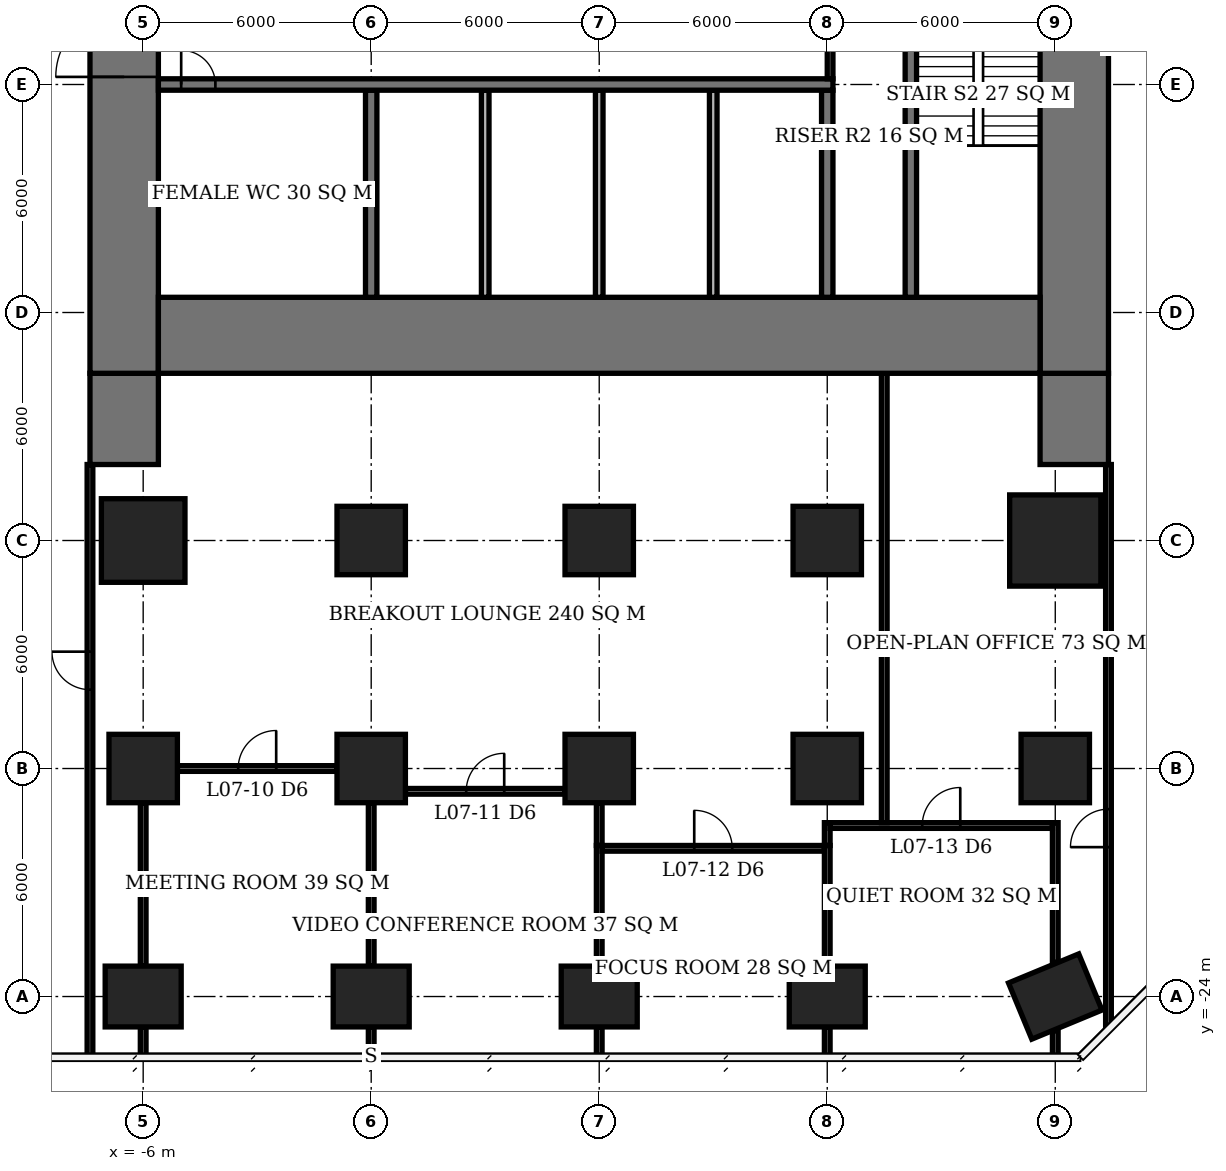
"""IFC4 building model, lengths in metres.
Left out: names, types, materials, properties, quantities, classifications, styles, units other than length and angle.
Written with IfcOpenShell. Run it as: python <this file> out.ifc"""

import sys

from ifc_helpers import new_model, si_unit, direction, frame, frame_2d, origin, origin_2d, place, context, subcontext, project, spatial, rectangle, extrude, element, fill, save


model = new_model("IFC4")
c1 = context("Model", 3, precision=1e-05, world=origin(), true_north=direction((0.0, 1.0)))
c2 = subcontext(c1, "Body", "Model", "MODEL_VIEW")
j1 = project(units=[si_unit("LENGTHUNIT", "METRE"), si_unit("PLANEANGLEUNIT", "RADIAN")], contexts=[c1])
p1 = place(None, origin())
s1 = spatial("IfcSite", under=j1, at=p1, CompositionType="ELEMENT")
p2 = place(p1, origin())
s2 = spatial("IfcBuilding", under=s1, at=p2, CompositionType="ELEMENT")
p3 = place(p2, frame((0.0, 0.0, 33.8)))
s3 = spatial("IfcBuildingStorey", under=s2, at=p3, CompositionType="ELEMENT", Elevation=33.8)
p4 = place(p3, frame((-6.0, -24.0, 0.0), z_axis=(0.0, 0.0, 1.0), x_axis=(1.0, 0.0, 0.0)))
e1 = element("IfcColumn", 1, at=p4, inside=s3, PredefinedType="COLUMN", context=c2, shape_type="SweptSolid", body=[
    extrude(rectangle(XDim=2.0, YDim=1.6, at=origin_2d()), origin(), (0.0, 0.0, 1.0), 3.9),
])
p5 = place(p3, frame((-6.0, -18.0, 0.0), z_axis=(0.0, 0.0, 1.0), x_axis=(1.0, 0.0, 0.0)))
e2 = element("IfcColumn", 2, at=p5, inside=s3, PredefinedType="COLUMN", context=c2, shape_type="SweptSolid", body=[
    extrude(rectangle(XDim=1.8, YDim=1.8, at=origin_2d()), origin(), (0.0, 0.0, 1.0), 3.9),
])
p6 = place(p3, frame((-6.0, -12.0, 0.0), z_axis=(0.0, 0.0, 1.0), x_axis=(1.0, 0.0, 0.0)))
e3 = element("IfcColumn", 3, at=p6, inside=s3, PredefinedType="COLUMN", context=c2, shape_type="SweptSolid", body=[
    extrude(rectangle(XDim=2.2, YDim=2.2, at=origin_2d()), origin(), (0.0, 0.0, 1.0), 3.9),
])
p7 = place(p3, frame((0.0, -24.0, 0.0), z_axis=(0.0, 0.0, 1.0), x_axis=(1.0, 0.0, 0.0)))
e4 = element("IfcColumn", 4, at=p7, inside=s3, PredefinedType="COLUMN", context=c2, shape_type="SweptSolid", body=[
    extrude(rectangle(XDim=2.0, YDim=1.6, at=origin_2d()), origin(), (0.0, 0.0, 1.0), 3.9),
])
for number, where, z_axis, x_axis in (
    (5, (0.0, -18.0, 0.0), (0.0, 0.0, 1.0), (1.0, 0.0, 0.0)),
    (6, (0.0, -12.0, 0.0), (0.0, 0.0, 1.0), (1.0, 0.0, 0.0)),
):
    element("IfcColumn", number, at=place(p3, frame(where, z_axis=z_axis, x_axis=x_axis)), inside=s3, PredefinedType="COLUMN", context=c2, shape_type="SweptSolid", body=[
        extrude(rectangle(XDim=1.8, YDim=1.8, at=origin_2d()), origin(), (0.0, 0.0, 1.0), 3.9),
    ])
p8 = place(p3, frame((6.0, -24.0, 0.0), z_axis=(0.0, 0.0, 1.0), x_axis=(1.0, 0.0, 0.0)))
e7 = element("IfcColumn", 7, at=p8, inside=s3, PredefinedType="COLUMN", context=c2, shape_type="SweptSolid", body=[
    extrude(rectangle(XDim=2.0, YDim=1.6, at=origin_2d()), origin(), (0.0, 0.0, 1.0), 3.9),
])
for number, where, z_axis, x_axis in (
    (8, (6.0, -18.0, 0.0), (0.0, 0.0, 1.0), (1.0, 0.0, 0.0)),
    (9, (6.0, -12.0, 0.0), (0.0, 0.0, 1.0), (1.0, 0.0, 0.0)),
):
    element("IfcColumn", number, at=place(p3, frame(where, z_axis=z_axis, x_axis=x_axis)), inside=s3, PredefinedType="COLUMN", context=c2, shape_type="SweptSolid", body=[
        extrude(rectangle(XDim=1.8, YDim=1.8, at=origin_2d()), origin(), (0.0, 0.0, 1.0), 3.9),
    ])
p9 = place(p3, frame((12.0, -24.0, 0.0), z_axis=(0.0, 0.0, 1.0), x_axis=(1.0, 0.0, 0.0)))
e10 = element("IfcColumn", 10, at=p9, inside=s3, PredefinedType="COLUMN", context=c2, shape_type="SweptSolid", body=[
    extrude(rectangle(XDim=2.0, YDim=1.6, at=origin_2d()), origin(), (0.0, 0.0, 1.0), 3.9),
])
for number, where, z_axis, x_axis in (
    (11, (12.0, -18.0, 0.0), (0.0, 0.0, 1.0), (1.0, 0.0, 0.0)),
    (12, (12.0, -12.0, 0.0), (0.0, 0.0, 1.0), (1.0, 0.0, 0.0)),
):
    element("IfcColumn", number, at=place(p3, frame(where, z_axis=z_axis, x_axis=x_axis)), inside=s3, PredefinedType="COLUMN", context=c2, shape_type="SweptSolid", body=[
        extrude(rectangle(XDim=1.8, YDim=1.8, at=origin_2d()), origin(), (0.0, 0.0, 1.0), 3.9),
    ])
p10 = place(p3, frame((18.0, -24.0, 0.0), z_axis=(0.0, 0.0, 1.0), x_axis=(-0.923879532511, -0.382683432365, 0.0)))
e13 = element("IfcColumn", 13, at=p10, inside=s3, PredefinedType="COLUMN", context=c2, shape_type="SweptSolid", body=[
    extrude(rectangle(XDim=2.0, YDim=1.6, at=origin_2d()), origin(), (0.0, 0.0, 1.0), 3.9),
])
p11 = place(p3, frame((18.0, -18.0, 0.0), z_axis=(0.0, 0.0, 1.0), x_axis=(1.0, 0.0, 0.0)))
e14 = element("IfcColumn", 14, at=p11, inside=s3, PredefinedType="COLUMN", context=c2, shape_type="SweptSolid", body=[
    extrude(rectangle(XDim=1.8, YDim=1.8, at=origin_2d()), origin(), (0.0, 0.0, 1.0), 3.9),
])
p12 = place(p3, frame((18.0, -12.0, 0.0), z_axis=(0.0, 0.0, 1.0), x_axis=(1.0, 0.0, 0.0)))
e15 = element("IfcColumn", 15, at=p12, inside=s3, PredefinedType="COLUMN", context=c2, shape_type="SweptSolid", body=[
    extrude(rectangle(XDim=2.4, YDim=2.4, at=origin_2d()), origin(), (0.0, 0.0, 1.0), 3.9),
])
p13 = place(p3, frame((-5.6, -6.6, 0.0), z_axis=(0.0, 0.0, 1.0), x_axis=(1.0, 0.0, 0.0)))
e16 = element("IfcWall", 16, at=p13, inside=s3, PredefinedType="SHEAR", context=c2, shape_type="SweptSolid", body=[
    extrude(rectangle(XDim=23.2, YDim=2.0, at=frame_2d((11.6, 0.0))), origin(), (0.0, 0.0, 1.0), 3.9),
])
p14 = place(p3, frame((-6.5, -7.6, 0.0), z_axis=(0.0, 0.0, 1.0), x_axis=(0.0, 1.0, 0.0)))
e17 = element("IfcWall", 17, at=p14, inside=s3, PredefinedType="SHEAR", context=c2, shape_type="SweptSolid", body=[
    extrude(rectangle(XDim=21.2, YDim=1.8, at=frame_2d((10.6, 0.0))), origin(), (0.0, 0.0, 1.0), 3.9),
])
p15 = place(p14, frame((7.8, 0.0, 0.0)))
e18 = element("IfcOpeningElement", 18, at=p15, cuts=e17, PredefinedType="OPENING", context=c2, shape_type="SweptSolid", body=[
    extrude(rectangle(XDim=1.8, YDim=2.4, at=frame_2d((0.9, 1.2))), frame((0.0, 0.91, 0.0), z_axis=(0.0, -1.0, 0.0), x_axis=(1.0, 0.0, 0.0)), (0.0, 0.0, 1.0), 1.82),
])
p16 = place(p3, frame((18.5, -7.6, 0.0), z_axis=(0.0, 0.0, 1.0), x_axis=(0.0, 1.0, 0.0)))
e19 = element("IfcWall", 19, at=p16, inside=s3, PredefinedType="SHEAR", context=c2, shape_type="SweptSolid", body=[
    extrude(rectangle(XDim=21.2, YDim=1.8, at=frame_2d((10.6, 0.0))), origin(), (0.0, 0.0, 1.0), 3.9),
])
p17 = place(p16, frame((9.2, 0.0, 0.0)))
e20 = element("IfcOpeningElement", 20, at=p17, cuts=e19, PredefinedType="OPENING", context=c2, shape_type="SweptSolid", body=[
    extrude(rectangle(XDim=1.8, YDim=2.4, at=frame_2d((0.9, 1.2))), frame((0.0, 0.91, 0.0), z_axis=(0.0, -1.0, 0.0), x_axis=(1.0, 0.0, 0.0)), (0.0, 0.0, 1.0), 1.82),
])
for number, where, z_axis, x_axis in (
    (21, (-6.5, -10.0, 0.0), (0.0, 0.0, 1.0), (0.0, 1.0, 0.0)),
    (22, (18.5, -10.0, 0.0), (0.0, 0.0, 1.0), (0.0, 1.0, 0.0)),
):
    element("IfcWall", number, at=place(p3, frame(where, z_axis=z_axis, x_axis=x_axis)), inside=s3, PredefinedType="SHEAR", context=c2, shape_type="SweptSolid", body=[
        extrude(rectangle(XDim=2.4, YDim=1.8, at=frame_2d((1.2, 0.0))), origin(), (0.0, 0.0, 1.0), 3.9),
    ])
p18 = place(p3, frame((-5.6, 0.0, 0.0), z_axis=(0.0, 0.0, 1.0), x_axis=(1.0, 0.0, 0.0)))
e23 = element("IfcWall", 23, at=p18, inside=s3, PredefinedType="SHEAR", context=c2, shape_type="SweptSolid", body=[
    extrude(rectangle(XDim=17.75, YDim=0.3, at=frame_2d((8.875, 0.0))), origin(), (0.0, 0.0, 1.0), 3.9),
])
p19 = place(p18, frame((0.6, 0.0, 0.0)))
e24 = element("IfcOpeningElement", 24, at=p19, cuts=e23, PredefinedType="OPENING", context=c2, shape_type="SweptSolid", body=[
    extrude(rectangle(XDim=0.9, YDim=2.1, at=frame_2d((0.45, 1.05))), frame((0.0, 0.16, 0.0), z_axis=(0.0, -1.0, 0.0), x_axis=(1.0, 0.0, 0.0)), (0.0, 0.0, 1.0), 0.32),
])
for number, where, z_axis, x_axis in (
    (25, (0.0, -5.6, 0.0), (0.0, 0.0, 1.0), (0.0, 1.0, 0.0)),
    (26, (12.0, -5.6, 0.0), (0.0, 0.0, 1.0), (0.0, 1.0, 0.0)),
):
    element("IfcWall", number, at=place(p3, frame(where, z_axis=z_axis, x_axis=x_axis)), inside=s3, PredefinedType="SHEAR", context=c2, shape_type="SweptSolid", body=[
        extrude(rectangle(XDim=5.45, YDim=0.3, at=frame_2d((2.725, 0.0))), origin(), (0.0, 0.0, 1.0), 3.9),
    ])
p20 = place(p3, frame((14.2, -5.6, 0.0), z_axis=(0.0, 0.0, 1.0), x_axis=(0.0, 1.0, 0.0)))
e27 = element("IfcWall", 27, at=p20, inside=s3, PredefinedType="SHEAR", context=c2, shape_type="SweptSolid", body=[
    extrude(rectangle(XDim=8.45, YDim=0.3, at=frame_2d((4.225, 0.0))), origin(), (0.0, 0.0, 1.0), 3.9),
])
for number, where, z_axis, x_axis in (
    (28, (3.0, -5.6, 0.0), (0.0, 0.0, 1.0), (0.0, 1.0, 0.0)),
    (29, (6.0, -5.6, 0.0), (0.0, 0.0, 1.0), (0.0, 1.0, 0.0)),
    (30, (9.0, -5.6, 0.0), (0.0, 0.0, 1.0), (0.0, 1.0, 0.0)),
):
    element("IfcWall", number, at=place(p3, frame(where, z_axis=z_axis, x_axis=x_axis)), inside=s3, PredefinedType="SOLIDWALL", context=c2, shape_type="SweptSolid", body=[
        extrude(rectangle(XDim=5.45, YDim=0.2, at=frame_2d((2.725, 0.0))), origin(), (0.0, 0.0, 1.0), 3.9),
    ])
p21 = place(p3, frame((6.075, -20.1, 0.0), z_axis=(0.0, 0.0, 1.0), x_axis=(1.0, 0.0, 0.0)))
e31 = element("IfcWall", 31, at=p21, inside=s3, PredefinedType="PARTITIONING", context=c2, shape_type="SweptSolid", body=[
    extrude(rectangle(XDim=5.85, YDim=0.15, at=frame_2d((2.925, 0.0))), origin(), (0.0, 0.0, 1.0), 3.65),
])
p22 = place(p21, frame((2.425, 0.0, 0.0)))
e32 = element("IfcOpeningElement", 32, at=p22, cuts=e31, PredefinedType="OPENING", context=c2, shape_type="SweptSolid", body=[
    extrude(rectangle(XDim=1.0, YDim=2.1, at=frame_2d((0.5, 1.05))), frame((0.0, 0.085, 0.0), z_axis=(0.0, -1.0, 0.0), x_axis=(1.0, 0.0, 0.0)), (0.0, 0.0, 1.0), 0.17),
])
p23 = place(p3, frame((12.075, -19.5, 0.0), z_axis=(0.0, 0.0, 1.0), x_axis=(1.0, 0.0, 0.0)))
e33 = element("IfcWall", 33, at=p23, inside=s3, PredefinedType="PARTITIONING", context=c2, shape_type="SweptSolid", body=[
    extrude(rectangle(XDim=5.85, YDim=0.15, at=frame_2d((2.925, 0.0))), origin(), (0.0, 0.0, 1.0), 3.65),
])
p24 = place(p23, frame((2.425, 0.0, 0.0)))
e34 = element("IfcOpeningElement", 34, at=p24, cuts=e33, PredefinedType="OPENING", context=c2, shape_type="SweptSolid", body=[
    extrude(rectangle(XDim=1.0, YDim=2.1, at=frame_2d((0.5, 1.05))), frame((0.0, 0.085, 0.0), z_axis=(0.0, -1.0, 0.0), x_axis=(1.0, 0.0, 0.0)), (0.0, 0.0, 1.0), 0.17),
])
p25 = place(p3, frame((0.9, -18.6, 0.0), z_axis=(0.0, 0.0, 1.0), x_axis=(1.0, 0.0, 0.0)))
e35 = element("IfcWall", 35, at=p25, inside=s3, PredefinedType="PARTITIONING", context=c2, shape_type="SweptSolid", body=[
    extrude(rectangle(XDim=4.2, YDim=0.15, at=frame_2d((2.1, 0.0))), origin(), (0.0, 0.0, 1.0), 3.65),
])
p26 = place(p25, frame((1.6, 0.0, 0.0)))
e36 = element("IfcOpeningElement", 36, at=p26, cuts=e35, PredefinedType="OPENING", context=c2, shape_type="SweptSolid", body=[
    extrude(rectangle(XDim=1.0, YDim=2.1, at=frame_2d((0.5, 1.05))), frame((0.0, 0.085, 0.0), z_axis=(0.0, -1.0, 0.0), x_axis=(1.0, 0.0, 0.0)), (0.0, 0.0, 1.0), 0.17),
])
p27 = place(p3, frame((-5.1, -18.0, 0.0), z_axis=(0.0, 0.0, 1.0), x_axis=(1.0, 0.0, 0.0)))
e37 = element("IfcWall", 37, at=p27, inside=s3, PredefinedType="PARTITIONING", context=c2, shape_type="SweptSolid", body=[
    extrude(rectangle(XDim=4.2, YDim=0.15, at=frame_2d((2.1, 0.0))), origin(), (0.0, 0.0, 1.0), 3.65),
])
p28 = place(p27, frame((1.6, 0.0, 0.0)))
e38 = element("IfcOpeningElement", 38, at=p28, cuts=e37, PredefinedType="OPENING", context=c2, shape_type="SweptSolid", body=[
    extrude(rectangle(XDim=1.0, YDim=2.1, at=frame_2d((0.5, 1.05))), frame((0.0, 0.085, 0.0), z_axis=(0.0, -1.0, 0.0), x_axis=(1.0, 0.0, 0.0)), (0.0, 0.0, 1.0), 0.17),
])
p29 = place(p3, frame((-6.0, -25.6, 0.0), z_axis=(0.0, 0.0, 1.0), x_axis=(0.0, 1.0, 0.0)))
e39 = element("IfcWall", 39, at=p29, inside=s3, PredefinedType="PARTITIONING", context=c2, shape_type="SweptSolid", body=[
    extrude(rectangle(XDim=0.8, YDim=0.15, at=frame_2d((0.4, 0.0))), origin(), (0.0, 0.0, 1.0), 3.65),
])
p30 = place(p3, frame((-6.0, -23.2, 0.0), z_axis=(0.0, 0.0, 1.0), x_axis=(0.0, 1.0, 0.0)))
e40 = element("IfcWall", 40, at=p30, inside=s3, PredefinedType="PARTITIONING", context=c2, shape_type="SweptSolid", body=[
    extrude(rectangle(XDim=4.3, YDim=0.15, at=frame_2d((2.15, 0.0))), origin(), (0.0, 0.0, 1.0), 3.65),
])
p31 = place(p3, frame((0.0, -25.55, 0.0), z_axis=(0.0, 0.0, 1.0), x_axis=(0.0, 1.0, 0.0)))
e41 = element("IfcWall", 41, at=p31, inside=s3, PredefinedType="PARTITIONING", context=c2, shape_type="SweptSolid", body=[
    extrude(rectangle(XDim=0.75, YDim=0.15, at=frame_2d((0.375, 0.0))), origin(), (0.0, 0.0, 1.0), 3.65),
])
p32 = place(p3, frame((0.0, -23.2, 0.0), z_axis=(0.0, 0.0, 1.0), x_axis=(0.0, 1.0, 0.0)))
e42 = element("IfcWall", 42, at=p32, inside=s3, PredefinedType="PARTITIONING", context=c2, shape_type="SweptSolid", body=[
    extrude(rectangle(XDim=4.3, YDim=0.15, at=frame_2d((2.15, 0.0))), origin(), (0.0, 0.0, 1.0), 3.65),
])
p33 = place(p3, frame((6.0, -25.6, 0.0), z_axis=(0.0, 0.0, 1.0), x_axis=(0.0, 1.0, 0.0)))
e43 = element("IfcWall", 43, at=p33, inside=s3, PredefinedType="PARTITIONING", context=c2, shape_type="SweptSolid", body=[
    extrude(rectangle(XDim=0.8, YDim=0.15, at=frame_2d((0.4, 0.0))), origin(), (0.0, 0.0, 1.0), 3.65),
])
p34 = place(p3, frame((6.0, -23.2, 0.0), z_axis=(0.0, 0.0, 1.0), x_axis=(0.0, 1.0, 0.0)))
e44 = element("IfcWall", 44, at=p34, inside=s3, PredefinedType="PARTITIONING", context=c2, shape_type="SweptSolid", body=[
    extrude(rectangle(XDim=3.175, YDim=0.15, at=frame_2d((1.587, 0.0))), origin(), (0.0, 0.0, 1.0), 3.65),
])
p35 = place(p3, frame((6.0, -20.025, 0.0), z_axis=(0.0, 0.0, 1.0), x_axis=(0.0, 1.0, 0.0)))
e45 = element("IfcWall", 45, at=p35, inside=s3, PredefinedType="PARTITIONING", context=c2, shape_type="SweptSolid", body=[
    extrude(rectangle(XDim=1.125, YDim=0.15, at=frame_2d((0.562, 0.0))), origin(), (0.0, 0.0, 1.0), 3.65),
])
p36 = place(p3, frame((12.0, -25.6, 0.0), z_axis=(0.0, 0.0, 1.0), x_axis=(0.0, 1.0, 0.0)))
e46 = element("IfcWall", 46, at=p36, inside=s3, PredefinedType="PARTITIONING", context=c2, shape_type="SweptSolid", body=[
    extrude(rectangle(XDim=0.8, YDim=0.15, at=frame_2d((0.4, 0.0))), origin(), (0.0, 0.0, 1.0), 3.65),
])
p37 = place(p3, frame((12.0, -23.2, 0.0), z_axis=(0.0, 0.0, 1.0), x_axis=(0.0, 1.0, 0.0)))
e47 = element("IfcWall", 47, at=p37, inside=s3, PredefinedType="PARTITIONING", context=c2, shape_type="SweptSolid", body=[
    extrude(rectangle(XDim=3.175, YDim=0.15, at=frame_2d((1.587, 0.0))), origin(), (0.0, 0.0, 1.0), 3.65),
])
p38 = place(p3, frame((12.0, -20.025, 0.0), z_axis=(0.0, 0.0, 1.0), x_axis=(0.0, 1.0, 0.0)))
e48 = element("IfcWall", 48, at=p38, inside=s3, PredefinedType="PARTITIONING", context=c2, shape_type="SweptSolid", body=[
    extrude(rectangle(XDim=0.6, YDim=0.15, at=frame_2d((0.3, 0.0))), origin(), (0.0, 0.0, 1.0), 3.65),
])
p39 = place(p3, frame((18.0, -25.6, 0.0), z_axis=(0.0, 0.0, 1.0), x_axis=(0.0, 1.0, 0.0)))
e49 = element("IfcWall", 49, at=p39, inside=s3, PredefinedType="PARTITIONING", context=c2, shape_type="SweptSolid", body=[
    extrude(rectangle(XDim=0.703, YDim=0.15, at=frame_2d((0.352, 0.0))), origin(), (0.0, 0.0, 1.0), 3.65),
])
p40 = place(p3, frame((18.0, -23.103, 0.0), z_axis=(0.0, 0.0, 1.0), x_axis=(0.0, 1.0, 0.0)))
e50 = element("IfcWall", 50, at=p40, inside=s3, PredefinedType="PARTITIONING", context=c2, shape_type="SweptSolid", body=[
    extrude(rectangle(XDim=3.678, YDim=0.15, at=frame_2d((1.839, 0.0))), origin(), (0.0, 0.0, 1.0), 3.65),
])
p41 = place(p3, frame((-7.4, -25.6, 0.0), z_axis=(0.0, 0.0, 1.0), x_axis=(0.0, 1.0, 0.0)))
e51 = element("IfcWall", 51, at=p41, inside=s3, PredefinedType="PARTITIONING", context=c2, shape_type="SweptSolid", body=[
    extrude(rectangle(XDim=15.6, YDim=0.15, at=frame_2d((7.8, 0.0))), origin(), (0.0, 0.0, 1.0), 3.65),
])
p42 = place(p41, frame((9.675, 0.0, 0.0)))
e52 = element("IfcOpeningElement", 52, at=p42, cuts=e51, PredefinedType="OPENING", context=c2, shape_type="SweptSolid", body=[
    extrude(rectangle(XDim=1.0, YDim=2.1, at=frame_2d((0.5, 1.05))), frame((0.0, 0.085, 0.0), z_axis=(0.0, -1.0, 0.0), x_axis=(1.0, 0.0, 0.0)), (0.0, 0.0, 1.0), 0.17),
])
p43 = place(p3, frame((13.5, -19.425, 0.0), z_axis=(0.0, 0.0, 1.0), x_axis=(0.0, 1.0, 0.0)))
e53 = element("IfcWall", 53, at=p43, inside=s3, PredefinedType="PARTITIONING", context=c2, shape_type="SweptSolid", body=[
    extrude(rectangle(XDim=11.825, YDim=0.15, at=frame_2d((5.913, 0.0))), origin(), (0.0, 0.0, 1.0), 3.65),
])
p44 = place(p3, frame((19.4, -24.771, 0.0), z_axis=(0.0, 0.0, 1.0), x_axis=(0.0, 1.0, 0.0)))
e54 = element("IfcWall", 54, at=p44, inside=s3, PredefinedType="PARTITIONING", context=c2, shape_type="SweptSolid", body=[
    extrude(rectangle(XDim=14.771, YDim=0.15, at=frame_2d((7.385, 0.0))), origin(), (0.0, 0.0, 1.0), 3.65),
])
p45 = place(p44, frame((4.702, 0.0, 0.0)))
e55 = element("IfcOpeningElement", 55, at=p45, cuts=e54, PredefinedType="OPENING", context=c2, shape_type="SweptSolid", body=[
    extrude(rectangle(XDim=1.0, YDim=2.1, at=frame_2d((0.5, 1.05))), frame((0.0, 0.085, 0.0), z_axis=(0.0, -1.0, 0.0), x_axis=(1.0, 0.0, 0.0)), (0.0, 0.0, 1.0), 0.17),
])
p46 = place(p3, frame((12.075, 0.15, 0.0), z_axis=(0.0, 0.0, 1.0), x_axis=(0.0, 1.0, 0.0)))
e56 = element("IfcWall", 56, at=p46, inside=s3, PredefinedType="PARTITIONING", context=c2, shape_type="SweptSolid", body=[
    extrude(rectangle(XDim=3.0, YDim=0.15, at=frame_2d((1.5, 0.0))), origin(), (0.0, 0.0, 1.0), 3.65),
])
p47 = place(p15, origin())
e57 = element("IfcDoor", 57, at=p47, inside=s3, OperationType="DOUBLE_DOOR_SINGLE_SWING", PredefinedType="DOOR", context=c2, shape_type="SweptSolid", body=[
    extrude(rectangle(XDim=1.8, YDim=2.4, at=frame_2d((0.9, 1.2))), frame((0.0, 0.025, 0.0), z_axis=(0.0, -1.0, 0.0), x_axis=(1.0, 0.0, 0.0)), (0.0, 0.0, 1.0), 0.05),
])
fill(e18, e57)
p48 = place(p19, origin())
e58 = element("IfcDoor", 58, at=p48, inside=s3, OperationType="SINGLE_SWING_LEFT", PredefinedType="DOOR", context=c2, shape_type="SweptSolid", body=[
    extrude(rectangle(XDim=0.9, YDim=2.1, at=frame_2d((0.45, 1.05))), frame((0.0, 0.025, 0.0), z_axis=(0.0, -1.0, 0.0), x_axis=(1.0, 0.0, 0.0)), (0.0, 0.0, 1.0), 0.05),
])
fill(e24, e58)
p49 = place(p28, origin())
e59 = element("IfcDoor", 59, at=p49, inside=s3, OperationType="SINGLE_SWING_RIGHT", PredefinedType="DOOR", context=c2, shape_type="SweptSolid", body=[
    extrude(rectangle(XDim=1.0, YDim=2.1, at=frame_2d((0.5, 1.05))), frame((0.0, 0.025, 0.0), z_axis=(0.0, -1.0, 0.0), x_axis=(1.0, 0.0, 0.0)), (0.0, 0.0, 1.0), 0.05),
])
fill(e38, e59)
p50 = place(p26, origin())
e60 = element("IfcDoor", 60, at=p50, inside=s3, OperationType="SINGLE_SWING_RIGHT", PredefinedType="DOOR", context=c2, shape_type="SweptSolid", body=[
    extrude(rectangle(XDim=1.0, YDim=2.1, at=frame_2d((0.5, 1.05))), frame((0.0, 0.025, 0.0), z_axis=(0.0, -1.0, 0.0), x_axis=(1.0, 0.0, 0.0)), (0.0, 0.0, 1.0), 0.05),
])
fill(e36, e60)
p51 = place(p22, origin())
e61 = element("IfcDoor", 61, at=p51, inside=s3, OperationType="SINGLE_SWING_LEFT", PredefinedType="DOOR", context=c2, shape_type="SweptSolid", body=[
    extrude(rectangle(XDim=1.0, YDim=2.1, at=frame_2d((0.5, 1.05))), frame((0.0, 0.025, 0.0), z_axis=(0.0, -1.0, 0.0), x_axis=(1.0, 0.0, 0.0)), (0.0, 0.0, 1.0), 0.05),
])
fill(e32, e61)
p52 = place(p24, origin())
e62 = element("IfcDoor", 62, at=p52, inside=s3, OperationType="SINGLE_SWING_RIGHT", PredefinedType="DOOR", context=c2, shape_type="SweptSolid", body=[
    extrude(rectangle(XDim=1.0, YDim=2.1, at=frame_2d((0.5, 1.05))), frame((0.0, 0.025, 0.0), z_axis=(0.0, -1.0, 0.0), x_axis=(1.0, 0.0, 0.0)), (0.0, 0.0, 1.0), 0.05),
])
fill(e34, e62)
p53 = place(p45, origin())
e63 = element("IfcDoor", 63, at=p53, inside=s3, OperationType="SINGLE_SWING_LEFT", PredefinedType="DOOR", context=c2, shape_type="SweptSolid", body=[
    extrude(rectangle(XDim=1.0, YDim=2.1, at=frame_2d((0.5, 1.05))), frame((0.0, 0.025, 0.0), z_axis=(0.0, -1.0, 0.0), x_axis=(1.0, 0.0, 0.0)), (0.0, 0.0, 1.0), 0.05),
])
fill(e55, e63)
p54 = place(p42, origin())
e64 = element("IfcDoor", 64, at=p54, inside=s3, OperationType="SINGLE_SWING_RIGHT", PredefinedType="DOOR", context=c2, shape_type="SweptSolid", body=[
    extrude(rectangle(XDim=1.0, YDim=2.1, at=frame_2d((0.5, 1.05))), frame((0.0, 0.025, 0.0), z_axis=(0.0, -1.0, 0.0), x_axis=(1.0, 0.0, 0.0)), (0.0, 0.0, 1.0), 0.05),
])
fill(e52, e64)
save(model, sys.argv[1])
